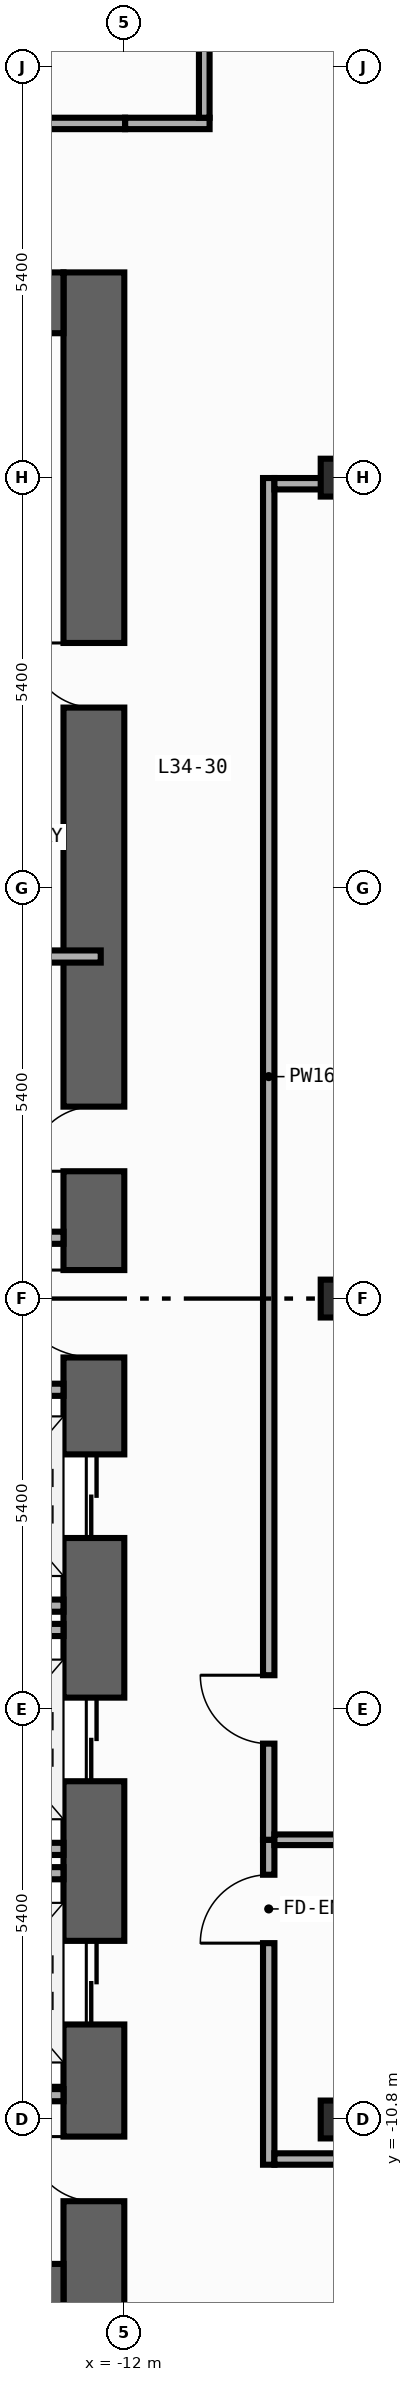
"""IFC4 building model, lengths in metres.
Left out: names, types, materials, properties, quantities, classifications, styles, units other than length and angle.
Written with IfcOpenShell. Run it as: python <this file> out.ifc"""

import sys

from ifc_helpers import new_model, si_unit, direction, frame, frame_2d, origin, origin_2d, place, context, subcontext, project, spatial, rectangle, i_section, extrude, element, fill, save


model = new_model("IFC4")
c1 = context("Model", 3, precision=1e-05, world=origin(), true_north=direction((0.0, 1.0)))
c2 = subcontext(c1, "Body", "Model", "MODEL_VIEW")
j1 = project(units=[si_unit("LENGTHUNIT", "METRE"), si_unit("PLANEANGLEUNIT", "RADIAN")], contexts=[c1])
p1 = place(None, origin())
s1 = spatial("IfcSite", under=j1, at=p1, CompositionType="ELEMENT")
p2 = place(p1, origin())
s2 = spatial("IfcBuilding", under=s1, at=p2, CompositionType="ELEMENT")
p3 = place(p2, frame((0.0, 0.0, 147.8)))
s3 = spatial("IfcBuildingStorey", under=s2, at=p3, CompositionType="ELEMENT", Elevation=147.8)
p4 = place(p3, frame((-12.4, -13.5, 0.0), z_axis=(0.0, 0.0, 1.0), x_axis=(0.0, 1.0, 0.0)))
e1 = element("IfcWall", 1, at=p4, inside=s3, PredefinedType="SHEAR", context=c2, shape_type="SweptSolid", body=[
    extrude(rectangle(XDim=27.0, YDim=0.8, at=frame_2d((13.5, 0.0))), origin(), (0.0, 0.0, 1.0), 3.85),
])
p5 = place(p4, frame((10.35, 0.0, 0.0)))
e2 = element("IfcOpeningElement", 2, at=p5, cuts=e1, PredefinedType="OPENING", context=c2, shape_type="SweptSolid", body=[
    extrude(rectangle(XDim=1.1, YDim=2.2, at=frame_2d((0.55, 1.1))), frame((0.0, 0.41, 0.0), z_axis=(0.0, -1.0, 0.0), x_axis=(1.0, 0.0, 0.0)), (0.0, 0.0, 1.0), 0.82),
])
p6 = place(p4, frame((7.15, 0.0, 0.0)))
e3 = element("IfcOpeningElement", 3, at=p6, cuts=e1, PredefinedType="OPENING", context=c2, shape_type="SweptSolid", body=[
    extrude(rectangle(XDim=1.1, YDim=2.2, at=frame_2d((0.55, 1.1))), frame((0.0, 0.41, 0.0), z_axis=(0.0, -1.0, 0.0), x_axis=(1.0, 0.0, 0.0)), (0.0, 0.0, 1.0), 0.82),
])
p7 = place(p4, frame((3.95, 0.0, 0.0)))
e4 = element("IfcOpeningElement", 4, at=p7, cuts=e1, PredefinedType="OPENING", context=c2, shape_type="SweptSolid", body=[
    extrude(rectangle(XDim=1.1, YDim=2.2, at=frame_2d((0.55, 1.1))), frame((0.0, 0.41, 0.0), z_axis=(0.0, -1.0, 0.0), x_axis=(1.0, 0.0, 0.0)), (0.0, 0.0, 1.0), 0.82),
])
p8 = place(p4, frame((15.175, 0.0, 0.0)))
e5 = element("IfcOpeningElement", 5, at=p8, cuts=e1, PredefinedType="OPENING", context=c2, shape_type="SweptSolid", body=[
    extrude(rectangle(XDim=0.85, YDim=2.1, at=frame_2d((0.425, 1.05))), frame((0.0, 0.41, 0.0), z_axis=(0.0, -1.0, 0.0), x_axis=(1.0, 0.0, 0.0)), (0.0, 0.0, 1.0), 0.82),
])
p9 = place(p4, frame((21.275, 0.0, 0.0)))
e6 = element("IfcOpeningElement", 6, at=p9, cuts=e1, PredefinedType="OPENING", context=c2, shape_type="SweptSolid", body=[
    extrude(rectangle(XDim=0.85, YDim=2.1, at=frame_2d((0.425, 1.05))), frame((0.0, 0.41, 0.0), z_axis=(0.0, -1.0, 0.0), x_axis=(1.0, 0.0, 0.0)), (0.0, 0.0, 1.0), 0.82),
])
p10 = place(p4, frame((12.725, 0.0, 0.0)))
e7 = element("IfcOpeningElement", 7, at=p10, cuts=e1, PredefinedType="OPENING", context=c2, shape_type="SweptSolid", body=[
    extrude(rectangle(XDim=1.15, YDim=2.2, at=frame_2d((0.575, 1.1))), frame((0.0, 0.41, 0.0), z_axis=(0.0, -1.0, 0.0), x_axis=(1.0, 0.0, 0.0)), (0.0, 0.0, 1.0), 0.82),
])
p11 = place(p4, frame((1.625, 0.0, 0.0)))
e8 = element("IfcOpeningElement", 8, at=p11, cuts=e1, PredefinedType="OPENING", context=c2, shape_type="SweptSolid", body=[
    extrude(rectangle(XDim=0.85, YDim=2.1, at=frame_2d((0.425, 1.05))), frame((0.0, 0.41, 0.0), z_axis=(0.0, -1.0, 0.0), x_axis=(1.0, 0.0, 0.0)), (0.0, 0.0, 1.0), 0.82),
])
for number, where, z_axis, x_axis in (
    (9, (-19.6, -13.1, 0.0), (0.0, 0.0, 1.0), (1.0, 0.0, 0.0)),
    (10, (-19.6, 13.1, 0.0), (0.0, 0.0, 1.0), (1.0, 0.0, 0.0)),
):
    element("IfcWall", number, at=place(p3, frame(where, z_axis=z_axis, x_axis=x_axis)), inside=s3, PredefinedType="SHEAR", context=c2, shape_type="SweptSolid", body=[
        extrude(rectangle(XDim=6.8, YDim=0.8, at=frame_2d((3.4, 0.0))), origin(), (0.0, 0.0, 1.0), 3.85),
    ])
for number, where, z_axis, x_axis in (
    (11, (-9.2, -10.8, 0.0), (0.0, 0.0, 1.0), (1.0, 0.0, 0.0)),
    (12, (-9.2, 0.0, 0.0), (0.0, 0.0, 1.0), (1.0, 0.0, 0.0)),
    (13, (-9.2, 10.8, 0.0), (0.0, 0.0, 1.0), (1.0, 0.0, 0.0)),
):
    element("IfcColumn", number, at=place(p3, frame(where, z_axis=z_axis, x_axis=x_axis)), inside=s3, PredefinedType="COLUMN", context=c2, shape_type="SweptSolid", body=[
        extrude(i_section(OverallWidth=0.432, OverallDepth=0.498, WebThickness=0.045, FlangeThickness=0.07, FilletRadius=0.022, at=origin_2d()), origin(), (0.0, 0.0, 1.0), 4.2),
    ])
for number, where, z_axis, x_axis in (
    (14, (-14.99, -4.04, 0.0), (0.0, 0.0, 1.0), (1.0, 0.0, 0.0)),
    (15, (-14.99, -7.24, 0.0), (0.0, 0.0, 1.0), (1.0, 0.0, 0.0)),
    (16, (-14.99, -4.36, 0.0), (0.0, 0.0, 1.0), (1.0, 0.0, 0.0)),
    (17, (-14.99, -7.56, 0.0), (0.0, 0.0, 1.0), (1.0, 0.0, 0.0)),
):
    element("IfcWall", number, at=place(p3, frame(where, z_axis=z_axis, x_axis=x_axis)), inside=s3, PredefinedType="STANDARD", context=c2, shape_type="SweptSolid", body=[
        extrude(rectangle(XDim=2.19, YDim=0.16, at=frame_2d((1.095, 0.0))), origin(), (0.0, 0.0, 1.0), 3.85),
    ])
for number, where, z_axis, x_axis in (
    (18, (-15.4, 0.8, 0.0), (0.0, 0.0, 1.0), (1.0, 0.0, 0.0)),
    (19, (-15.4, -1.2, 0.0), (0.0, 0.0, 1.0), (1.0, 0.0, 0.0)),
    (20, (-15.4, -10.48, 0.0), (0.0, 0.0, 1.0), (1.0, 0.0, 0.0)),
):
    element("IfcWall", number, at=place(p3, frame(where, z_axis=z_axis, x_axis=x_axis)), inside=s3, PredefinedType="STANDARD", context=c2, shape_type="SweptSolid", body=[
        extrude(rectangle(XDim=2.6, YDim=0.16, at=frame_2d((1.3, 0.0))), origin(), (0.0, 0.0, 1.0), 3.85),
    ])
p12 = place(p3, frame((-15.375, 4.5, 0.0), z_axis=(0.0, 0.0, 1.0), x_axis=(1.0, 0.0, 0.0)))
e21 = element("IfcWall", 21, at=p12, inside=s3, PredefinedType="PARTITIONING", context=c2, shape_type="SweptSolid", body=[
    extrude(rectangle(XDim=3.065, YDim=0.16, at=frame_2d((1.532, 0.0))), origin(), (0.0, 0.0, 1.0), 3.85),
])
p13 = place(p3, frame((-11.99, 15.46, 0.0), z_axis=(0.0, 0.0, 1.0), x_axis=(1.0, 0.0, 0.0)))
e22 = element("IfcWall", 22, at=p13, inside=s3, PredefinedType="PARTITIONING", context=c2, shape_type="SweptSolid", body=[
    extrude(rectangle(XDim=1.112, YDim=0.15, at=frame_2d((0.556, 0.0))), origin(), (0.0, 0.0, 1.0), 3.85),
])
p14 = place(p3, frame((-10.1, -11.395, 0.0), z_axis=(0.0, 0.0, 1.0), x_axis=(0.0, 1.0, 0.0)))
e23 = element("IfcWall", 23, at=p14, inside=s3, PredefinedType="PARTITIONING", context=c2, shape_type="SweptSolid", body=[
    extrude(rectangle(XDim=4.275, YDim=0.15, at=frame_2d((2.137, 0.0))), origin(), (0.0, 0.0, 1.0), 3.85),
])
p15 = place(p14, frame((2.915, 0.0, 0.0)))
e24 = element("IfcOpeningElement", 24, at=p15, cuts=e23, PredefinedType="OPENING", context=c2, shape_type="SweptSolid", body=[
    extrude(rectangle(XDim=0.9, YDim=2.15, at=frame_2d((0.45, 1.075))), frame((0.0, 0.085, 0.0), z_axis=(0.0, -1.0, 0.0), x_axis=(1.0, 0.0, 0.0)), (0.0, 0.0, 1.0), 0.17),
])
p16 = place(p3, frame((-10.1, -7.12, 0.0), z_axis=(0.0, 0.0, 1.0), x_axis=(0.0, 1.0, 0.0)))
e25 = element("IfcWall", 25, at=p16, inside=s3, PredefinedType="PARTITIONING", context=c2, shape_type="SweptSolid", body=[
    extrude(rectangle(XDim=17.915, YDim=0.15, at=frame_2d((8.958, 0.0))), origin(), (0.0, 0.0, 1.0), 3.85),
])
p17 = place(p16, frame((1.265, 0.0, 0.0)))
e26 = element("IfcOpeningElement", 26, at=p17, cuts=e25, PredefinedType="OPENING", context=c2, shape_type="SweptSolid", body=[
    extrude(rectangle(XDim=0.9, YDim=2.15, at=frame_2d((0.45, 1.075))), frame((0.0, 0.085, 0.0), z_axis=(0.0, -1.0, 0.0), x_axis=(1.0, 0.0, 0.0)), (0.0, 0.0, 1.0), 0.17),
])
p18 = place(p3, frame((-10.025, 10.72, 0.0), z_axis=(0.0, 0.0, 1.0), x_axis=(1.0, 0.0, 0.0)))
e27 = element("IfcWall", 27, at=p18, inside=s3, PredefinedType="PARTITIONING", context=c2, shape_type="SweptSolid", body=[
    extrude(rectangle(XDim=16.22, YDim=0.15, at=frame_2d((8.11, 0.0))), origin(), (0.0, 0.0, 1.0), 3.15),
])
p19 = place(p18, frame((11.007, 0.0, 0.0)))
e28 = element("IfcOpeningElement", 28, at=p19, cuts=e27, PredefinedType="OPENING", context=c2, shape_type="SweptSolid", body=[
    extrude(rectangle(XDim=0.9, YDim=2.15, at=frame_2d((0.45, 1.075))), frame((0.0, 0.085, 0.0), z_axis=(0.0, -1.0, 0.0), x_axis=(1.0, 0.0, 0.0)), (0.0, 0.0, 1.0), 0.17),
])
p20 = place(p3, frame((-10.025, -11.32, 0.0), z_axis=(0.0, 0.0, 1.0), x_axis=(1.0, 0.0, 0.0)))
e29 = element("IfcWall", 29, at=p20, inside=s3, PredefinedType="PARTITIONING", context=c2, shape_type="SweptSolid", body=[
    extrude(rectangle(XDim=4.465, YDim=0.15, at=frame_2d((2.232, 0.0))), origin(), (0.0, 0.0, 1.0), 3.85),
])
p21 = place(p20, frame((3.105, 0.0, 0.0)))
e30 = element("IfcOpeningElement", 30, at=p21, cuts=e29, PredefinedType="OPENING", context=c2, shape_type="SweptSolid", body=[
    extrude(rectangle(XDim=0.9, YDim=2.15, at=frame_2d((0.45, 1.075))), frame((0.0, 0.085, 0.0), z_axis=(0.0, -1.0, 0.0), x_axis=(1.0, 0.0, 0.0)), (0.0, 0.0, 1.0), 0.17),
])
p22 = place(p3, frame((-20.64, 15.46, 0.0), z_axis=(0.0, 0.0, 1.0), x_axis=(1.0, 0.0, 0.0)))
e31 = element("IfcWall", 31, at=p22, inside=s3, PredefinedType="PARTITIONING", context=c2, shape_type="SweptSolid", body=[
    extrude(rectangle(XDim=8.65, YDim=0.15, at=frame_2d((4.325, 0.0))), origin(), (0.0, 0.0, 1.0), 3.85),
])
p23 = place(p22, frame((2.871, 0.0, 0.0)))
e32 = element("IfcOpeningElement", 32, at=p23, cuts=e31, PredefinedType="OPENING", context=c2, shape_type="SweptSolid", body=[
    extrude(rectangle(XDim=0.9, YDim=2.15, at=frame_2d((0.45, 1.075))), frame((0.0, 0.085, 0.0), z_axis=(0.0, -1.0, 0.0), x_axis=(1.0, 0.0, 0.0)), (0.0, 0.0, 1.0), 0.17),
])
p24 = place(p3, frame((-10.948, 15.535, 0.0), z_axis=(0.0, 0.0, 1.0), x_axis=(0.0, 1.0, 0.0)))
e33 = element("IfcWall", 33, at=p24, inside=s3, PredefinedType="PARTITIONING", context=c2, shape_type="SweptSolid", body=[
    extrude(rectangle(XDim=10.62, YDim=0.14, at=frame_2d((5.31, 0.0))), origin(), (0.0, 0.0, 1.0), 3.85),
])
p25 = place(p24, frame((6.293, 0.0, 0.0)))
e34 = element("IfcOpeningElement", 34, at=p25, cuts=e33, PredefinedType="OPENING", context=c2, shape_type="SweptSolid", body=[
    extrude(rectangle(XDim=0.85, YDim=2.1, at=frame_2d((0.425, 1.05))), frame((0.0, 0.08, 0.0), z_axis=(0.0, -1.0, 0.0), x_axis=(1.0, 0.0, 0.0)), (0.0, 0.0, 1.0), 0.16),
])
p26 = place(p3, frame((-10.025, -7.12, 0.0), z_axis=(0.0, 0.0, 1.0), x_axis=(1.0, 0.0, 0.0)))
e35 = element("IfcWall", 35, at=p26, inside=s3, PredefinedType="PARTITIONING", context=c2, shape_type="SweptSolid", body=[
    extrude(rectangle(XDim=4.465, YDim=0.14, at=frame_2d((2.232, 0.0))), origin(), (0.0, 0.0, 1.0), 3.85),
])
p27 = place(p5, origin())
e36 = element("IfcDoor", 36, at=p27, inside=s3, OperationType="DOUBLE_DOOR_SLIDING", PredefinedType="DOOR", context=c2, shape_type="SweptSolid", body=[
    extrude(rectangle(XDim=1.1, YDim=2.2, at=frame_2d((0.55, 1.1))), frame((0.0, 0.025, 0.0), z_axis=(0.0, -1.0, 0.0), x_axis=(1.0, 0.0, 0.0)), (0.0, 0.0, 1.0), 0.05),
])
fill(e2, e36)
p28 = place(p6, origin())
e37 = element("IfcDoor", 37, at=p28, inside=s3, OperationType="DOUBLE_DOOR_SLIDING", PredefinedType="DOOR", context=c2, shape_type="SweptSolid", body=[
    extrude(rectangle(XDim=1.1, YDim=2.2, at=frame_2d((0.55, 1.1))), frame((0.0, 0.025, 0.0), z_axis=(0.0, -1.0, 0.0), x_axis=(1.0, 0.0, 0.0)), (0.0, 0.0, 1.0), 0.05),
])
fill(e3, e37)
p29 = place(p7, origin())
e38 = element("IfcDoor", 38, at=p29, inside=s3, OperationType="DOUBLE_DOOR_SLIDING", PredefinedType="DOOR", context=c2, shape_type="SweptSolid", body=[
    extrude(rectangle(XDim=1.1, YDim=2.2, at=frame_2d((0.55, 1.1))), frame((0.0, 0.025, 0.0), z_axis=(0.0, -1.0, 0.0), x_axis=(1.0, 0.0, 0.0)), (0.0, 0.0, 1.0), 0.05),
])
fill(e4, e38)
p30 = place(p8, origin())
e39 = element("IfcDoor", 39, at=p30, inside=s3, OperationType="SINGLE_SWING_LEFT", PredefinedType="DOOR", context=c2, shape_type="SweptSolid", body=[
    extrude(rectangle(XDim=0.85, YDim=2.1, at=frame_2d((0.425, 1.05))), frame((0.0, 0.025, 0.0), z_axis=(0.0, -1.0, 0.0), x_axis=(1.0, 0.0, 0.0)), (0.0, 0.0, 1.0), 0.05),
])
fill(e5, e39)
p31 = place(p9, origin())
e40 = element("IfcDoor", 40, at=p31, inside=s3, OperationType="SINGLE_SWING_RIGHT", PredefinedType="DOOR", context=c2, shape_type="SweptSolid", body=[
    extrude(rectangle(XDim=0.85, YDim=2.1, at=frame_2d((0.425, 1.05))), frame((0.0, 0.025, 0.0), z_axis=(0.0, -1.0, 0.0), x_axis=(1.0, 0.0, 0.0)), (0.0, 0.0, 1.0), 0.05),
])
fill(e6, e40)
p32 = place(p10, origin())
e41 = element("IfcDoor", 41, at=p32, inside=s3, OperationType="SINGLE_SWING_RIGHT", PredefinedType="DOOR", context=c2, shape_type="SweptSolid", body=[
    extrude(rectangle(XDim=1.15, YDim=2.2, at=frame_2d((0.575, 1.1))), frame((0.0, 0.025, 0.0), z_axis=(0.0, -1.0, 0.0), x_axis=(1.0, 0.0, 0.0)), (0.0, 0.0, 1.0), 0.05),
])
fill(e7, e41)
p33 = place(p11, origin())
e42 = element("IfcDoor", 42, at=p33, inside=s3, OperationType="SINGLE_SWING_RIGHT", PredefinedType="DOOR", context=c2, shape_type="SweptSolid", body=[
    extrude(rectangle(XDim=0.85, YDim=2.1, at=frame_2d((0.425, 1.05))), frame((0.0, 0.025, 0.0), z_axis=(0.0, -1.0, 0.0), x_axis=(1.0, 0.0, 0.0)), (0.0, 0.0, 1.0), 0.05),
])
fill(e8, e42)
p34 = place(p15, origin())
e43 = element("IfcDoor", 43, at=p34, inside=s3, OperationType="SINGLE_SWING_LEFT", PredefinedType="DOOR", context=c2, shape_type="SweptSolid", body=[
    extrude(rectangle(XDim=0.9, YDim=2.15, at=frame_2d((0.45, 1.075))), frame((0.0, 0.025, 0.0), z_axis=(0.0, -1.0, 0.0), x_axis=(1.0, 0.0, 0.0)), (0.0, 0.0, 1.0), 0.05),
])
fill(e24, e43)
p35 = place(p17, origin())
e44 = element("IfcDoor", 44, at=p35, inside=s3, OperationType="SINGLE_SWING_RIGHT", PredefinedType="DOOR", context=c2, shape_type="SweptSolid", body=[
    extrude(rectangle(XDim=0.9, YDim=2.15, at=frame_2d((0.45, 1.075))), frame((0.0, 0.025, 0.0), z_axis=(0.0, -1.0, 0.0), x_axis=(1.0, 0.0, 0.0)), (0.0, 0.0, 1.0), 0.05),
])
fill(e26, e44)
save(model, sys.argv[1])
